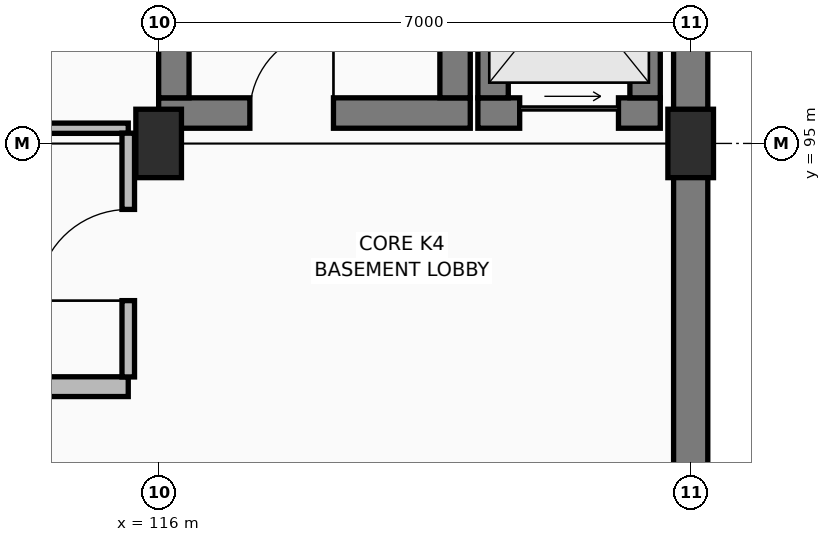
"""IFC4 building model, lengths in metres.
Left out: names, types, materials, properties, quantities, classifications, styles, units other than length and angle.
Written with IfcOpenShell. Run it as: python <this file> out.ifc"""

import sys

from ifc_helpers import new_model, si_unit, direction, frame, frame_2d, origin, origin_2d, place, context, subcontext, project, spatial, rectangle, extrude, element, fill, save


model = new_model("IFC4")
c1 = context("Model", 3, precision=1e-05, world=origin(), true_north=direction((0.0, 1.0)))
c2 = subcontext(c1, "Body", "Model", "MODEL_VIEW")
j1 = project(units=[si_unit("LENGTHUNIT", "METRE"), si_unit("PLANEANGLEUNIT", "RADIAN")], contexts=[c1])
p1 = place(None, origin())
s1 = spatial("IfcSite", under=j1, at=p1, CompositionType="ELEMENT")
p2 = place(p1, origin())
s2 = spatial("IfcBuilding", under=s1, at=p2, CompositionType="ELEMENT")
p3 = place(p2, frame((0.0, 0.0, -4.5)))
s3 = spatial("IfcBuildingStorey", under=s2, at=p3, CompositionType="ELEMENT", Elevation=-4.5)
for number, where, z_axis, x_axis in (
    (1, (116.0, 95.0, 0.0), (0.0, 0.0, 1.0), (1.0, 0.0, 0.0)),
    (2, (123.0, 95.0, 0.0), (0.0, 0.0, 1.0), (1.0, 0.0, 0.0)),
):
    element("IfcColumn", number, at=place(p3, frame(where, z_axis=z_axis, x_axis=x_axis)), inside=s3, PredefinedType="COLUMN", context=c2, shape_type="SweptSolid", body=[
        extrude(rectangle(XDim=0.6, YDim=0.9, at=origin_2d()), origin(), (0.0, 0.0, 1.0), 4.5),
    ])
for number, where, z_axis, x_axis in (
    (3, (123.0, 90.72, 0.0), (0.0, 0.0, 1.0), (0.0, 1.0, 0.0)),
    (4, (123.0, 95.445, 0.0), (0.0, 0.0, 1.0), (0.0, 1.0, 0.0)),
):
    element("IfcWall", number, at=place(p3, frame(where, z_axis=z_axis, x_axis=x_axis)), inside=s3, PredefinedType="USERDEFINED", context=c2, shape_type="SweptSolid", body=[
        extrude(rectangle(XDim=3.835, YDim=0.45, at=frame_2d((1.917, 0.0))), origin(), (0.0, 0.0, 1.0), 3.125),
    ])
p4 = place(p3, frame((116.0, 95.4, 0.0), z_axis=(0.0, 0.0, 1.0), x_axis=(1.0, 0.0, 0.0)))
e5 = element("IfcWall", 5, at=p4, inside=s3, PredefinedType="SHEAR", context=c2, shape_type="SweptSolid", body=[
    extrude(rectangle(XDim=4.1, YDim=0.4, at=frame_2d((2.05, 0.0))), origin(), (0.0, 0.0, 1.0), 4.19),
])
p5 = place(p4, frame((1.2, 0.0, 0.0)))
e6 = element("IfcOpeningElement", 6, at=p5, cuts=e5, PredefinedType="OPENING", context=c2, shape_type="SweptSolid", body=[
    extrude(rectangle(XDim=1.1, YDim=2.2, at=frame_2d((0.55, 1.1))), frame((0.0, 0.21, 0.0), z_axis=(0.0, -1.0, 0.0), x_axis=(1.0, 0.0, 0.0)), (0.0, 0.0, 1.0), 0.42),
])
for number, where, z_axis, x_axis in (
    (7, (119.9, 95.6, 0.0), (0.0, 0.0, 1.0), (0.0, 1.0, 0.0)),
    (8, (116.2, 103.0, 0.0), (0.0, 0.0, 1.0), (0.0, -1.0, 0.0)),
):
    element("IfcWall", number, at=place(p3, frame(where, z_axis=z_axis, x_axis=x_axis)), inside=s3, PredefinedType="SHEAR", context=c2, shape_type="SweptSolid", body=[
        extrude(rectangle(XDim=7.4, YDim=0.4, at=frame_2d((3.7, 0.0))), origin(), (0.0, 0.0, 1.0), 4.19),
    ])
p6 = place(p3, frame((120.2, 95.4, 0.0), z_axis=(0.0, 0.0, 1.0), x_axis=(1.0, 0.0, 0.0)))
e9 = element("IfcWall", 9, at=p6, inside=s3, PredefinedType="SHEAR", context=c2, shape_type="SweptSolid", body=[
    extrude(rectangle(XDim=2.4, YDim=0.4, at=frame_2d((1.2, 0.0))), origin(), (0.0, 0.0, 1.0), 4.19),
])
p7 = place(p6, frame((0.55, 0.0, 0.0)))
e10 = element("IfcOpeningElement", 10, at=p7, cuts=e9, PredefinedType="OPENING", context=c2, shape_type="SweptSolid", body=[
    extrude(rectangle(XDim=1.3, YDim=2.25, at=frame_2d((0.65, 1.125))), frame((0.0, 0.21, 0.0), z_axis=(0.0, -1.0, 0.0), x_axis=(1.0, 0.0, 0.0)), (0.0, 0.0, 1.0), 0.42),
])
for number, where, z_axis, x_axis in (
    (11, (122.4, 95.6, 0.0), (0.0, 0.0, 1.0), (0.0, 1.0, 0.0)),
    (12, (120.4, 98.6, 0.0), (0.0, 0.0, 1.0), (0.0, -1.0, 0.0)),
):
    element("IfcWall", number, at=place(p3, frame(where, z_axis=z_axis, x_axis=x_axis)), inside=s3, PredefinedType="SHEAR", context=c2, shape_type="SweptSolid", body=[
        extrude(rectangle(XDim=3.0, YDim=0.4, at=frame_2d((1.5, 0.0))), origin(), (0.0, 0.0, 1.0), 4.19),
    ])
p8 = place(p3, frame((95.223, 91.8, 0.0), z_axis=(0.0, 0.0, 1.0), x_axis=(1.0, 0.0, 0.0)))
e13 = element("IfcWall", 13, at=p8, inside=s3, PredefinedType="PARTITIONING", context=c2, shape_type="SweptSolid", body=[
    extrude(rectangle(XDim=20.377, YDim=0.26, at=frame_2d((10.188, 0.0))), origin(), (0.0, 0.0, 1.0), 2.935),
])
p9 = place(p8, frame((9.388, 0.0, 0.0)))
e14 = element("IfcOpeningElement", 14, at=p9, cuts=e13, PredefinedType="OPENING", context=c2, shape_type="SweptSolid", body=[
    extrude(rectangle(XDim=1.6, YDim=2.25, at=frame_2d((0.8, 1.125))), frame((0.0, 0.14, 0.0), z_axis=(0.0, -1.0, 0.0), x_axis=(1.0, 0.0, 0.0)), (0.0, 0.0, 1.0), 0.28),
])
p10 = place(p3, frame((95.2, 95.2, 0.0), z_axis=(0.0, 0.0, 1.0), x_axis=(1.0, 0.0, 0.0)))
e15 = element("IfcWall", 15, at=p10, inside=s3, PredefinedType="PARTITIONING", context=c2, shape_type="SweptSolid", body=[
    extrude(rectangle(XDim=20.4, YDim=0.135, at=frame_2d((10.2, 0.0))), origin(), (0.0, 0.0, 1.0), 2.935),
])
p11 = place(p10, frame((9.6, 0.0, 0.0)))
e16 = element("IfcOpeningElement", 16, at=p11, cuts=e15, PredefinedType="OPENING", context=c2, shape_type="SweptSolid", body=[
    extrude(rectangle(XDim=1.2, YDim=2.2, at=frame_2d((0.6, 1.1))), frame((0.0, 0.077, 0.0), z_axis=(0.0, -1.0, 0.0), x_axis=(1.0, 0.0, 0.0)), (0.0, 0.0, 1.0), 0.155),
])
p12 = place(p3, frame((115.6, 91.928, 0.0), z_axis=(0.0, 0.0, 1.0), x_axis=(0.0, 1.0, 0.0)))
e17 = element("IfcWall", 17, at=p12, inside=s3, PredefinedType="PARTITIONING", context=c2, shape_type="SweptSolid", body=[
    extrude(rectangle(XDim=3.207, YDim=0.165, at=frame_2d((1.604, 0.0))), origin(), (0.0, 0.0, 1.0), 2.935),
])
p13 = place(p12, frame((1.004, 0.0, 0.0)))
e18 = element("IfcOpeningElement", 18, at=p13, cuts=e17, PredefinedType="OPENING", context=c2, shape_type="SweptSolid", body=[
    extrude(rectangle(XDim=1.2, YDim=2.2, at=frame_2d((0.6, 1.1))), frame((0.0, 0.093, 0.0), z_axis=(0.0, -1.0, 0.0), x_axis=(1.0, 0.0, 0.0)), (0.0, 0.0, 1.0), 0.185),
])
p14 = place(p5, origin())
e19 = element("IfcDoor", 19, at=p14, inside=s3, OperationType="SINGLE_SWING_RIGHT", PredefinedType="DOOR", context=c2, shape_type="SweptSolid", body=[
    extrude(rectangle(XDim=1.1, YDim=2.2, at=frame_2d((0.55, 1.1))), frame((0.0, 0.025, 0.0), z_axis=(0.0, -1.0, 0.0), x_axis=(1.0, 0.0, 0.0)), (0.0, 0.0, 1.0), 0.05),
])
fill(e6, e19)
p15 = place(p7, origin())
e20 = element("IfcDoor", 20, at=p15, inside=s3, OperationType="SLIDING_TO_RIGHT", PredefinedType="DOOR", context=c2, shape_type="SweptSolid", body=[
    extrude(rectangle(XDim=1.3, YDim=2.25, at=frame_2d((0.65, 1.125))), frame((0.0, 0.025, 0.0), z_axis=(0.0, -1.0, 0.0), x_axis=(1.0, 0.0, 0.0)), (0.0, 0.0, 1.0), 0.05),
])
fill(e10, e20)
p16 = place(p13, origin())
e21 = element("IfcDoor", 21, at=p16, inside=s3, OperationType="SINGLE_SWING_LEFT", PredefinedType="DOOR", context=c2, shape_type="SweptSolid", body=[
    extrude(rectangle(XDim=1.2, YDim=2.2, at=frame_2d((0.6, 1.1))), frame((0.0, 0.025, 0.0), z_axis=(0.0, -1.0, 0.0), x_axis=(1.0, 0.0, 0.0)), (0.0, 0.0, 1.0), 0.05),
])
fill(e18, e21)
save(model, sys.argv[1])
